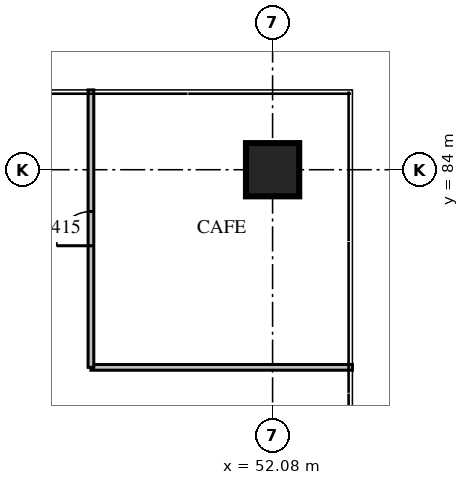
"""IFC4 building model, lengths in metres.
Left out: names, types, materials, properties, quantities, classifications, styles, units other than length and angle.
Written with IfcOpenShell. Run it as: python <this file> out.ifc"""

import sys

from ifc_helpers import new_model, si_unit, direction, frame, frame_2d, origin, origin_2d, place, context, subcontext, project, spatial, rectangle, extrude, source, transform, mapped, element, fill, save


model = new_model("IFC4")
c1 = context("Model", 3, precision=1e-05, world=origin(), true_north=direction((0.0, 1.0)))
c2 = subcontext(c1, "Body", "Model", "MODEL_VIEW")
j1 = project(units=[si_unit("LENGTHUNIT", "METRE"), si_unit("PLANEANGLEUNIT", "RADIAN")], contexts=[c1])
p1 = place(None, origin())
s1 = spatial("IfcSite", under=j1, at=p1, CompositionType="ELEMENT")
p2 = place(p1, origin())
s2 = spatial("IfcBuilding", under=s1, at=p2, CompositionType="ELEMENT")
p3 = place(p2, frame((0.0, 0.0, 7.5)))
s3 = spatial("IfcBuildingStorey", under=s2, at=p3, CompositionType="ELEMENT", Elevation=7.5)
m1 = source(origin(), c2, "Body", "SweptSolid", [
    extrude(rectangle(XDim=1.4, YDim=1.4, at=origin_2d()), origin(), (0.0, 0.0, 1.0), 5.4),
])
p4 = place(p3, frame((52.08, 84.0, 0.0), z_axis=(0.0, 0.0, 1.0), x_axis=(1.0, 0.0, 0.0)))
e1 = element("IfcColumn", 1, at=p4, inside=s3, PredefinedType="COLUMN", context=c2, shape_type="MappedRepresentation", body=[
    mapped(m1, transform((0.0, 0.0, 0.0), scale=1.0)),
])
m2 = source(origin(), c2, "Body", "SweptSolid", [
    extrude(rectangle(XDim=6.88, YDim=0.15, at=frame_2d((3.44, 0.0))), origin(), (0.0, 0.0, 1.0), 4.8),
])
p5 = place(p3, frame((47.3, 78.8, 0.0), z_axis=(0.0, 0.0, 1.0), x_axis=(1.0, 0.0, 0.0)))
e2 = element("IfcWall", 2, at=p5, inside=s3, PredefinedType="PARTITIONING", context=c2, shape_type="MappedRepresentation", body=[
    mapped(m2, transform((0.0, 0.0, 0.0), scale=1.0)),
])
m3 = source(origin(), c2, "Body", "SweptSolid", [
    extrude(rectangle(XDim=7.3, YDim=0.15, at=frame_2d((3.65, 0.0))), origin(), (0.0, 0.0, 1.0), 4.8),
])
p6 = place(p3, frame((47.3, 78.8, 0.0), z_axis=(0.0, 0.0, 1.0), x_axis=(0.0, 1.0, 0.0)))
e3 = element("IfcWall", 3, at=p6, inside=s3, PredefinedType="PARTITIONING", context=c2, shape_type="MappedRepresentation", body=[
    mapped(m3, transform((0.0, 0.0, 0.0), scale=1.0)),
])
m4 = source(origin(), c2, "Body", "SweptSolid", [
    extrude(rectangle(XDim=0.9, YDim=2.1, at=frame_2d((0.45, 1.05))), frame((0.0, 0.085, 0.0), z_axis=(0.0, -1.0, 0.0), x_axis=(1.0, 0.0, 0.0)), (0.0, 0.0, 1.0), 0.17),
])
p7 = place(p6, frame((3.2, 0.0, 0.0)))
e4 = element("IfcOpeningElement", 4, at=p7, cuts=e3, PredefinedType="OPENING", context=c2, shape_type="MappedRepresentation", body=[
    mapped(m4, transform((0.0, 0.0, 0.0), scale=1.0)),
])
m5 = source(origin(), c2, "Body", "SweptSolid", [
    extrude(rectangle(XDim=0.9, YDim=2.1, at=frame_2d((0.45, 1.05))), frame((0.0, 0.025, 0.0), z_axis=(0.0, -1.0, 0.0), x_axis=(1.0, 0.0, 0.0)), (0.0, 0.0, 1.0), 0.05),
])
p8 = place(p7, origin())
e5 = element("IfcDoor", 5, at=p8, inside=s3, OperationType="SINGLE_SWING_LEFT", PredefinedType="DOOR", context=c2, shape_type="MappedRepresentation", body=[
    mapped(m5, transform((0.0, 0.0, 0.0), scale=1.0)),
])
fill(e4, e5)
save(model, sys.argv[1])
